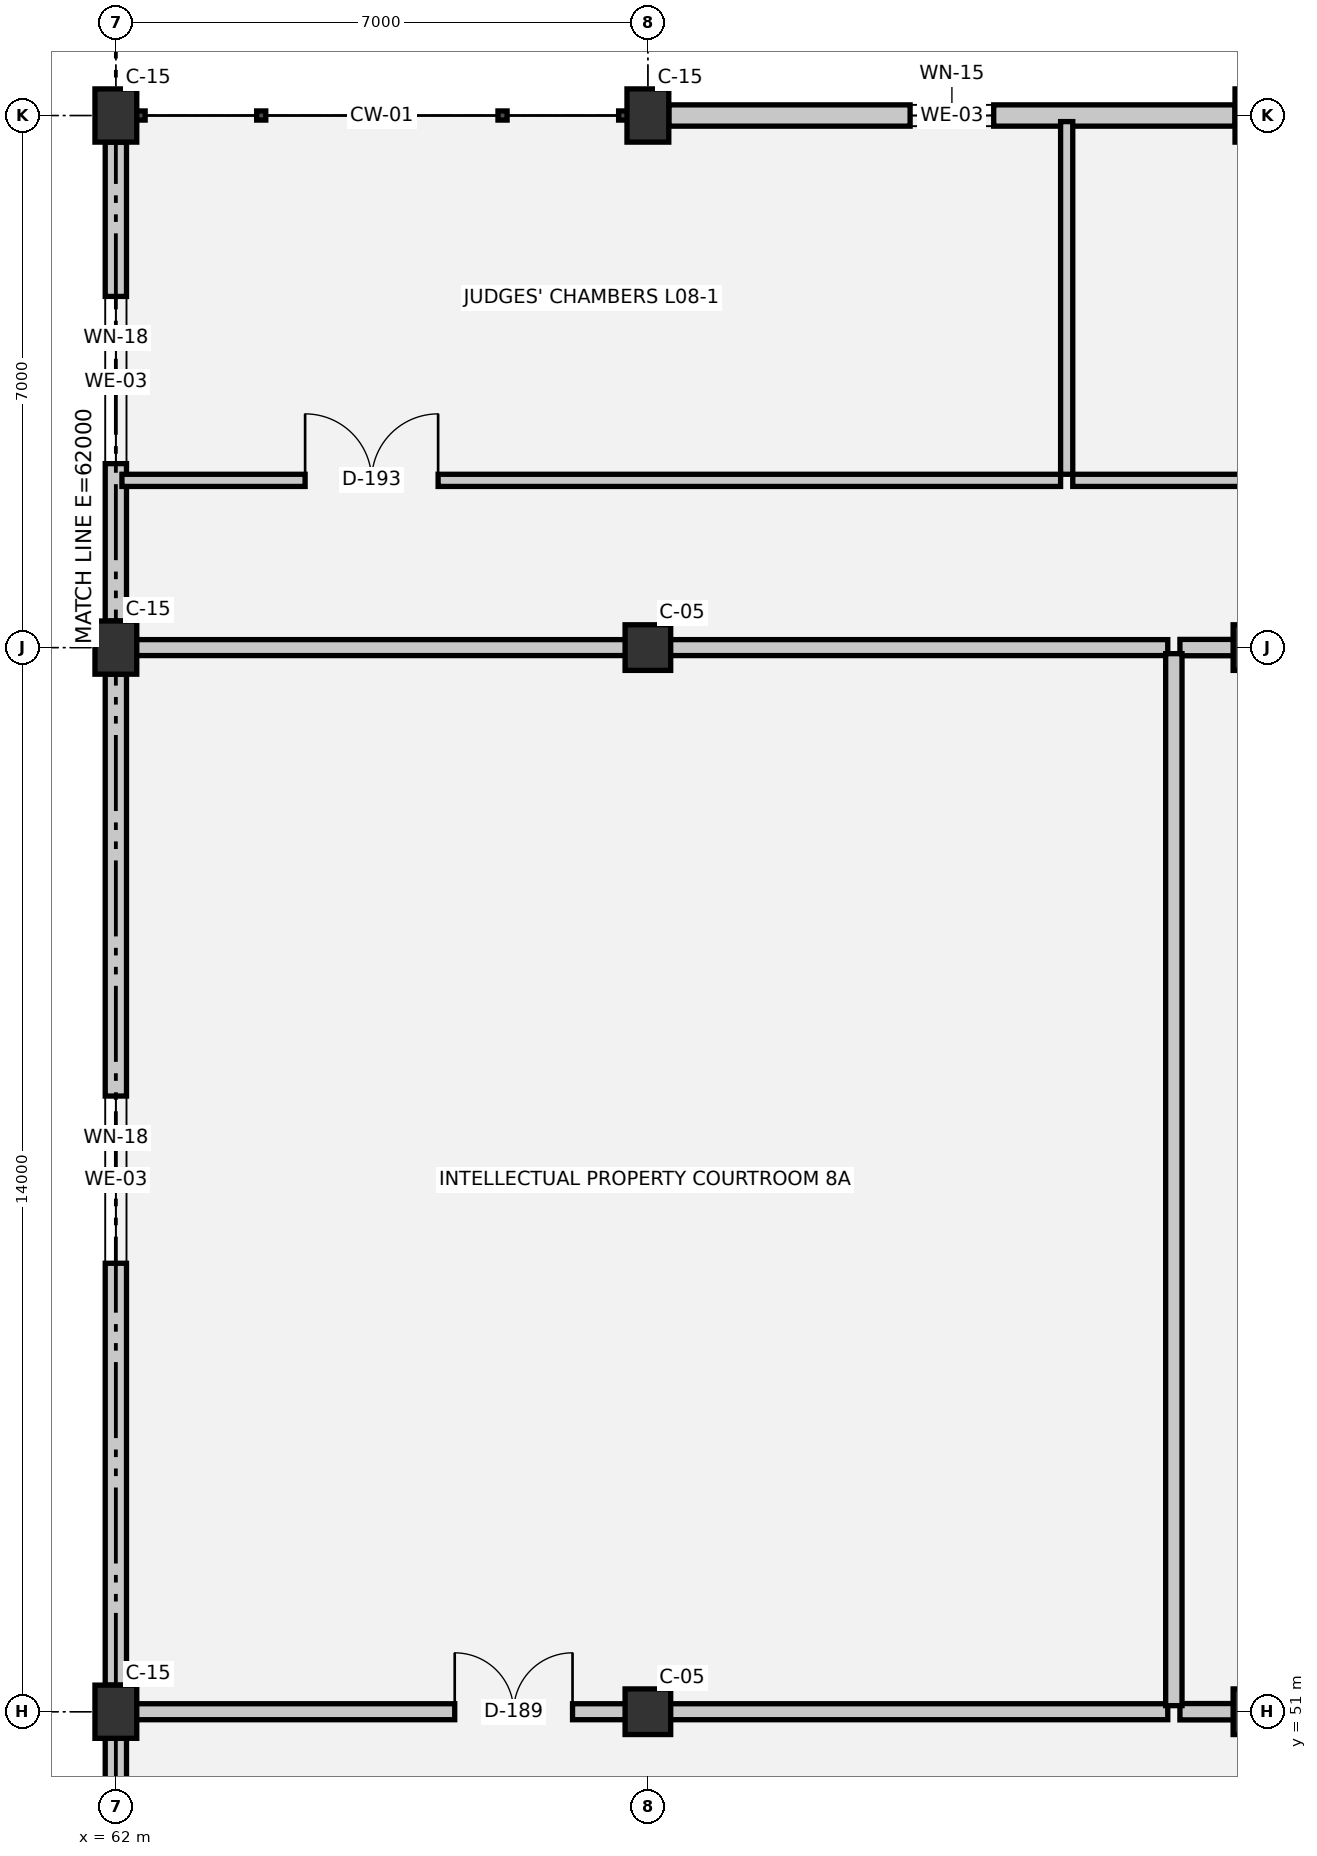
"""IFC4 building model, lengths in metres.
Left out: names, types, materials, properties, quantities, classifications, styles, units other than length and angle.
Written with IfcOpenShell. Run it as: python <this file> out.ifc"""

import sys

from ifc_helpers import new_model, si_unit, direction, frame, frame_2d, origin, origin_2d, place, context, subcontext, project, spatial, rectangle, extrude, element, fill, save


model = new_model("IFC4")
c1 = context("Model", 3, precision=1e-05, world=origin(), true_north=direction((0.0, 1.0)))
c2 = subcontext(c1, "Body", "Model", "MODEL_VIEW")
j1 = project(units=[si_unit("LENGTHUNIT", "METRE"), si_unit("PLANEANGLEUNIT", "RADIAN")], contexts=[c1])
p1 = place(None, origin())
s1 = spatial("IfcSite", under=j1, at=p1, CompositionType="ELEMENT")
p2 = place(p1, origin())
s2 = spatial("IfcBuilding", under=s1, at=p2, CompositionType="ELEMENT")
p3 = place(p2, frame((0.0, 0.0, 29.55)))
s3 = spatial("IfcBuildingStorey", under=s2, at=p3, CompositionType="ELEMENT", Elevation=29.55)
for number, where, z_axis, x_axis in (
    (1, (62.0, 51.0, 0.0), (0.0, 0.0, 1.0), (1.0, 0.0, 0.0)),
    (2, (62.0, 65.0, 0.0), (0.0, 0.0, 1.0), (1.0, 0.0, 0.0)),
    (3, (62.0, 72.0, 0.0), (0.0, 0.0, 1.0), (1.0, 0.0, 0.0)),
):
    element("IfcColumn", number, at=place(p3, frame(where, z_axis=z_axis, x_axis=x_axis)), inside=s3, PredefinedType="COLUMN", context=c2, shape_type="SweptSolid", body=[
        extrude(rectangle(XDim=0.55, YDim=0.7, at=origin_2d()), origin(), (0.0, 0.0, 1.0), 3.75),
    ])
for number, where, z_axis, x_axis in (
    (4, (69.0, 51.0, 0.0), (0.0, 0.0, 1.0), (1.0, 0.0, 0.0)),
    (5, (69.0, 65.0, 0.0), (0.0, 0.0, 1.0), (1.0, 0.0, 0.0)),
):
    element("IfcColumn", number, at=place(p3, frame(where, z_axis=z_axis, x_axis=x_axis)), inside=s3, PredefinedType="COLUMN", context=c2, shape_type="SweptSolid", body=[
        extrude(rectangle(XDim=0.6, YDim=0.6, at=origin_2d()), origin(), (0.0, 0.0, 1.0), 3.75),
    ])
p4 = place(p3, frame((69.0, 72.0, 0.0), z_axis=(0.0, 0.0, 1.0), x_axis=(1.0, 0.0, 0.0)))
e6 = element("IfcColumn", 6, at=p4, inside=s3, PredefinedType="COLUMN", context=c2, shape_type="SweptSolid", body=[
    extrude(rectangle(XDim=0.55, YDim=0.7, at=origin_2d()), origin(), (0.0, 0.0, 1.0), 3.75),
])
for number, where, z_axis, x_axis in (
    (7, (77.0, 51.0, 0.0), (0.0, 0.0, 1.0), (1.0, 0.0, 0.0)),
    (8, (77.0, 65.0, 0.0), (0.0, 0.0, 1.0), (1.0, 0.0, 0.0)),
):
    element("IfcColumn", number, at=place(p3, frame(where, z_axis=z_axis, x_axis=x_axis)), inside=s3, PredefinedType="COLUMN", context=c2, shape_type="SweptSolid", body=[
        extrude(rectangle(XDim=0.6, YDim=0.6, at=origin_2d()), origin(), (0.0, 0.0, 1.0), 3.75),
    ])
p5 = place(p3, frame((77.0, 72.0, 0.0), z_axis=(0.0, 0.0, 1.0), x_axis=(1.0, 0.0, 0.0)))
e9 = element("IfcColumn", 9, at=p5, inside=s3, PredefinedType="COLUMN", context=c2, shape_type="SweptSolid", body=[
    extrude(rectangle(XDim=0.55, YDim=0.7, at=origin_2d()), origin(), (0.0, 0.0, 1.0), 3.75),
])
p6 = place(p3, frame((62.0, 44.35, 0.0), z_axis=(0.0, 0.0, 1.0), x_axis=(0.0, 1.0, 0.0)))
e10 = element("IfcWall", 10, at=p6, inside=s3, PredefinedType="SOLIDWALL", context=c2, shape_type="SweptSolid", body=[
    extrude(rectangle(XDim=6.3, YDim=0.28, at=frame_2d((3.15, 0.0))), origin(), (0.0, 0.0, 1.0), 2.56),
])
p7 = place(p6, frame((1.43, 0.0, 0.9)))
e11 = element("IfcOpeningElement", 11, at=p7, cuts=e10, PredefinedType="OPENING", context=c2, shape_type="SweptSolid", body=[
    extrude(rectangle(XDim=2.2, YDim=1.0, at=frame_2d((1.1, 0.5))), frame((0.0, 0.15, 0.0), z_axis=(0.0, -1.0, 0.0), x_axis=(1.0, 0.0, 0.0)), (0.0, 0.0, 1.0), 0.3),
])
p8 = place(p3, frame((62.0, 51.35, 0.0), z_axis=(0.0, 0.0, 1.0), x_axis=(0.0, 1.0, 0.0)))
e12 = element("IfcWall", 12, at=p8, inside=s3, PredefinedType="SOLIDWALL", context=c2, shape_type="SweptSolid", body=[
    extrude(rectangle(XDim=13.3, YDim=0.28, at=frame_2d((6.65, 0.0))), origin(), (0.0, 0.0, 1.0), 2.56),
])
p9 = place(p8, frame((5.55, 0.0, 0.9)))
e13 = element("IfcOpeningElement", 13, at=p9, cuts=e12, PredefinedType="OPENING", context=c2, shape_type="SweptSolid", body=[
    extrude(rectangle(XDim=2.2, YDim=1.0, at=frame_2d((1.1, 0.5))), frame((0.0, 0.15, 0.0), z_axis=(0.0, -1.0, 0.0), x_axis=(1.0, 0.0, 0.0)), (0.0, 0.0, 1.0), 0.3),
])
p10 = place(p3, frame((62.0, 65.35, 0.0), z_axis=(0.0, 0.0, 1.0), x_axis=(0.0, 1.0, 0.0)))
e14 = element("IfcWall", 14, at=p10, inside=s3, PredefinedType="SOLIDWALL", context=c2, shape_type="SweptSolid", body=[
    extrude(rectangle(XDim=6.3, YDim=0.28, at=frame_2d((3.15, 0.0))), origin(), (0.0, 0.0, 1.0), 2.56),
])
p11 = place(p10, frame((2.07, 0.0, 0.9)))
e15 = element("IfcOpeningElement", 15, at=p11, cuts=e14, PredefinedType="OPENING", context=c2, shape_type="SweptSolid", body=[
    extrude(rectangle(XDim=2.2, YDim=1.0, at=frame_2d((1.1, 0.5))), frame((0.0, 0.15, 0.0), z_axis=(0.0, -1.0, 0.0), x_axis=(1.0, 0.0, 0.0)), (0.0, 0.0, 1.0), 0.3),
])
p12 = place(p3, frame((69.275, 72.0, 0.0), z_axis=(0.0, 0.0, 1.0), x_axis=(1.0, 0.0, 0.0)))
e16 = element("IfcWall", 16, at=p12, inside=s3, PredefinedType="SOLIDWALL", context=c2, shape_type="SweptSolid", body=[
    extrude(rectangle(XDim=7.45, YDim=0.28, at=frame_2d((3.725, 0.0))), origin(), (0.0, 0.0, 1.0), 2.56),
])
p13 = place(p12, frame((3.175, 0.0, 1.0)))
e17 = element("IfcOpeningElement", 17, at=p13, cuts=e16, PredefinedType="OPENING", context=c2, shape_type="SweptSolid", body=[
    extrude(rectangle(XDim=1.1, YDim=1.2, at=frame_2d((0.55, 0.6))), frame((0.0, 0.15, 0.0), z_axis=(0.0, -1.0, 0.0), x_axis=(1.0, 0.0, 0.0)), (0.0, 0.0, 1.0), 0.3),
])
p14 = place(p3, frame((62.08, 51.0, 0.0), z_axis=(0.0, 0.0, 1.0), x_axis=(1.0, 0.0, 0.0)))
e18 = element("IfcWall", 18, at=p14, inside=s3, PredefinedType="PARTITIONING", context=c2, shape_type="SweptSolid", body=[
    extrude(rectangle(XDim=13.76, YDim=0.21, at=frame_2d((6.88, 0.0))), origin(), (0.0, 0.0, 1.0), 2.78),
])
p15 = place(p14, frame((4.378, 0.0, 0.0)))
e19 = element("IfcOpeningElement", 19, at=p15, cuts=e18, PredefinedType="OPENING", context=c2, shape_type="SweptSolid", body=[
    extrude(rectangle(XDim=1.55, YDim=2.25, at=frame_2d((0.775, 1.125))), frame((0.0, 0.115, 0.0), z_axis=(0.0, -1.0, 0.0), x_axis=(1.0, 0.0, 0.0)), (0.0, 0.0, 1.0), 0.23),
])
p16 = place(p3, frame((76.0, 51.0, 0.0), z_axis=(0.0, 0.0, 1.0), x_axis=(1.0, 0.0, 0.0)))
e20 = element("IfcWall", 20, at=p16, inside=s3, PredefinedType="PARTITIONING", context=c2, shape_type="SweptSolid", body=[
    extrude(rectangle(XDim=1.2, YDim=0.215, at=frame_2d((0.6, 0.0))), origin(), (0.0, 0.0, 1.0), 2.78),
])
p17 = place(p3, frame((62.08, 65.0, 0.0), z_axis=(0.0, 0.0, 1.0), x_axis=(1.0, 0.0, 0.0)))
e21 = element("IfcWall", 21, at=p17, inside=s3, PredefinedType="PARTITIONING", context=c2, shape_type="SweptSolid", body=[
    extrude(rectangle(XDim=13.76, YDim=0.21, at=frame_2d((6.88, 0.0))), origin(), (0.0, 0.0, 1.0), 2.78),
])
p18 = place(p3, frame((76.0, 65.0, 0.0), z_axis=(0.0, 0.0, 1.0), x_axis=(1.0, 0.0, 0.0)))
e22 = element("IfcWall", 22, at=p18, inside=s3, PredefinedType="PARTITIONING", context=c2, shape_type="SweptSolid", body=[
    extrude(rectangle(XDim=13.76, YDim=0.215, at=frame_2d((6.88, 0.0))), origin(), (0.0, 0.0, 1.0), 2.78),
])
p19 = place(p18, frame((6.08, 0.0, 0.0)))
e23 = element("IfcOpeningElement", 23, at=p19, cuts=e22, PredefinedType="OPENING", context=c2, shape_type="SweptSolid", body=[
    extrude(rectangle(XDim=1.6, YDim=2.25, at=frame_2d((0.8, 1.125))), frame((0.0, 0.117, 0.0), z_axis=(0.0, -1.0, 0.0), x_axis=(1.0, 0.0, 0.0)), (0.0, 0.0, 1.0), 0.235),
])
p20 = place(p3, frame((62.08, 67.2, 0.0), z_axis=(0.0, 0.0, 1.0), x_axis=(1.0, 0.0, 0.0)))
e24 = element("IfcWall", 24, at=p20, inside=s3, PredefinedType="PARTITIONING", context=c2, shape_type="SweptSolid", body=[
    extrude(rectangle(XDim=12.35, YDim=0.16, at=frame_2d((6.175, 0.0))), origin(), (0.0, 0.0, 1.0), 3.39),
])
p21 = place(p20, frame((2.41, 0.0, 0.0)))
e25 = element("IfcOpeningElement", 25, at=p21, cuts=e24, PredefinedType="OPENING", context=c2, shape_type="SweptSolid", body=[
    extrude(rectangle(XDim=1.75, YDim=2.3, at=frame_2d((0.875, 1.15))), frame((0.0, 0.09, 0.0), z_axis=(0.0, -1.0, 0.0), x_axis=(1.0, 0.0, 0.0)), (0.0, 0.0, 1.0), 0.18),
])
p22 = place(p3, frame((74.59, 67.2, 0.0), z_axis=(0.0, 0.0, 1.0), x_axis=(1.0, 0.0, 0.0)))
e26 = element("IfcWall", 26, at=p22, inside=s3, PredefinedType="PARTITIONING", context=c2, shape_type="SweptSolid", body=[
    extrude(rectangle(XDim=9.46, YDim=0.16, at=frame_2d((4.73, 0.0))), origin(), (0.0, 0.0, 1.0), 3.39),
])
p23 = place(p22, frame((3.805, 0.0, 0.0)))
e27 = element("IfcOpeningElement", 27, at=p23, cuts=e26, PredefinedType="OPENING", context=c2, shape_type="SweptSolid", body=[
    extrude(rectangle(XDim=1.85, YDim=2.3, at=frame_2d((0.925, 1.15))), frame((0.0, 0.09, 0.0), z_axis=(0.0, -1.0, 0.0), x_axis=(1.0, 0.0, 0.0)), (0.0, 0.0, 1.0), 0.18),
])
p24 = place(p3, frame((74.51, 67.28, 0.0), z_axis=(0.0, 0.0, 1.0), x_axis=(0.0, 1.0, 0.0)))
e28 = element("IfcWall", 28, at=p24, inside=s3, PredefinedType="PARTITIONING", context=c2, shape_type="SweptSolid", body=[
    extrude(rectangle(XDim=4.64, YDim=0.16, at=frame_2d((2.32, 0.0))), origin(), (0.0, 0.0, 1.0), 3.39),
])
p25 = place(p3, frame((75.92, 51.08, 0.0), z_axis=(0.0, 0.0, 1.0), x_axis=(0.0, 1.0, 0.0)))
e29 = element("IfcWall", 29, at=p25, inside=s3, PredefinedType="PARTITIONING", context=c2, shape_type="SweptSolid", body=[
    extrude(rectangle(XDim=13.84, YDim=0.215, at=frame_2d((6.92, 0.0))), origin(), (0.0, 0.0, 1.0), 3.39),
])
p26 = place(p9, origin())
e30 = element("IfcWindow", 30, at=p26, inside=s3, PartitioningType="SINGLE_PANEL", PredefinedType="WINDOW", context=c2, shape_type="SweptSolid", body=[
    extrude(rectangle(XDim=2.2, YDim=1.0, at=frame_2d((1.1, 0.5))), frame((0.0, 0.03, 0.0), z_axis=(0.0, -1.0, 0.0), x_axis=(1.0, 0.0, 0.0)), (0.0, 0.0, 1.0), 0.06),
])
fill(e13, e30)
p27 = place(p11, origin())
e31 = element("IfcWindow", 31, at=p27, inside=s3, PartitioningType="SINGLE_PANEL", PredefinedType="WINDOW", context=c2, shape_type="SweptSolid", body=[
    extrude(rectangle(XDim=2.2, YDim=1.0, at=frame_2d((1.1, 0.5))), frame((0.0, 0.03, 0.0), z_axis=(0.0, -1.0, 0.0), x_axis=(1.0, 0.0, 0.0)), (0.0, 0.0, 1.0), 0.06),
])
fill(e15, e31)
p28 = place(p13, origin())
e32 = element("IfcWindow", 32, at=p28, inside=s3, PartitioningType="SINGLE_PANEL", PredefinedType="WINDOW", context=c2, shape_type="SweptSolid", body=[
    extrude(rectangle(XDim=1.1, YDim=1.2, at=frame_2d((0.55, 0.6))), frame((0.0, 0.03, 0.0), z_axis=(0.0, -1.0, 0.0), x_axis=(1.0, 0.0, 0.0)), (0.0, 0.0, 1.0), 0.06),
])
fill(e17, e32)
p29 = place(p15, origin())
e33 = element("IfcDoor", 33, at=p29, inside=s3, OperationType="DOUBLE_DOOR_SINGLE_SWING", PredefinedType="DOOR", context=c2, shape_type="SweptSolid", body=[
    extrude(rectangle(XDim=1.55, YDim=2.25, at=frame_2d((0.775, 1.125))), frame((0.0, 0.025, 0.0), z_axis=(0.0, -1.0, 0.0), x_axis=(1.0, 0.0, 0.0)), (0.0, 0.0, 1.0), 0.05),
])
fill(e19, e33)
p30 = place(p21, origin())
e34 = element("IfcDoor", 34, at=p30, inside=s3, OperationType="DOUBLE_DOOR_SINGLE_SWING", PredefinedType="DOOR", context=c2, shape_type="SweptSolid", body=[
    extrude(rectangle(XDim=1.75, YDim=2.3, at=frame_2d((0.875, 1.15))), frame((0.0, 0.025, 0.0), z_axis=(0.0, -1.0, 0.0), x_axis=(1.0, 0.0, 0.0)), (0.0, 0.0, 1.0), 0.05),
])
fill(e25, e34)
save(model, sys.argv[1])
